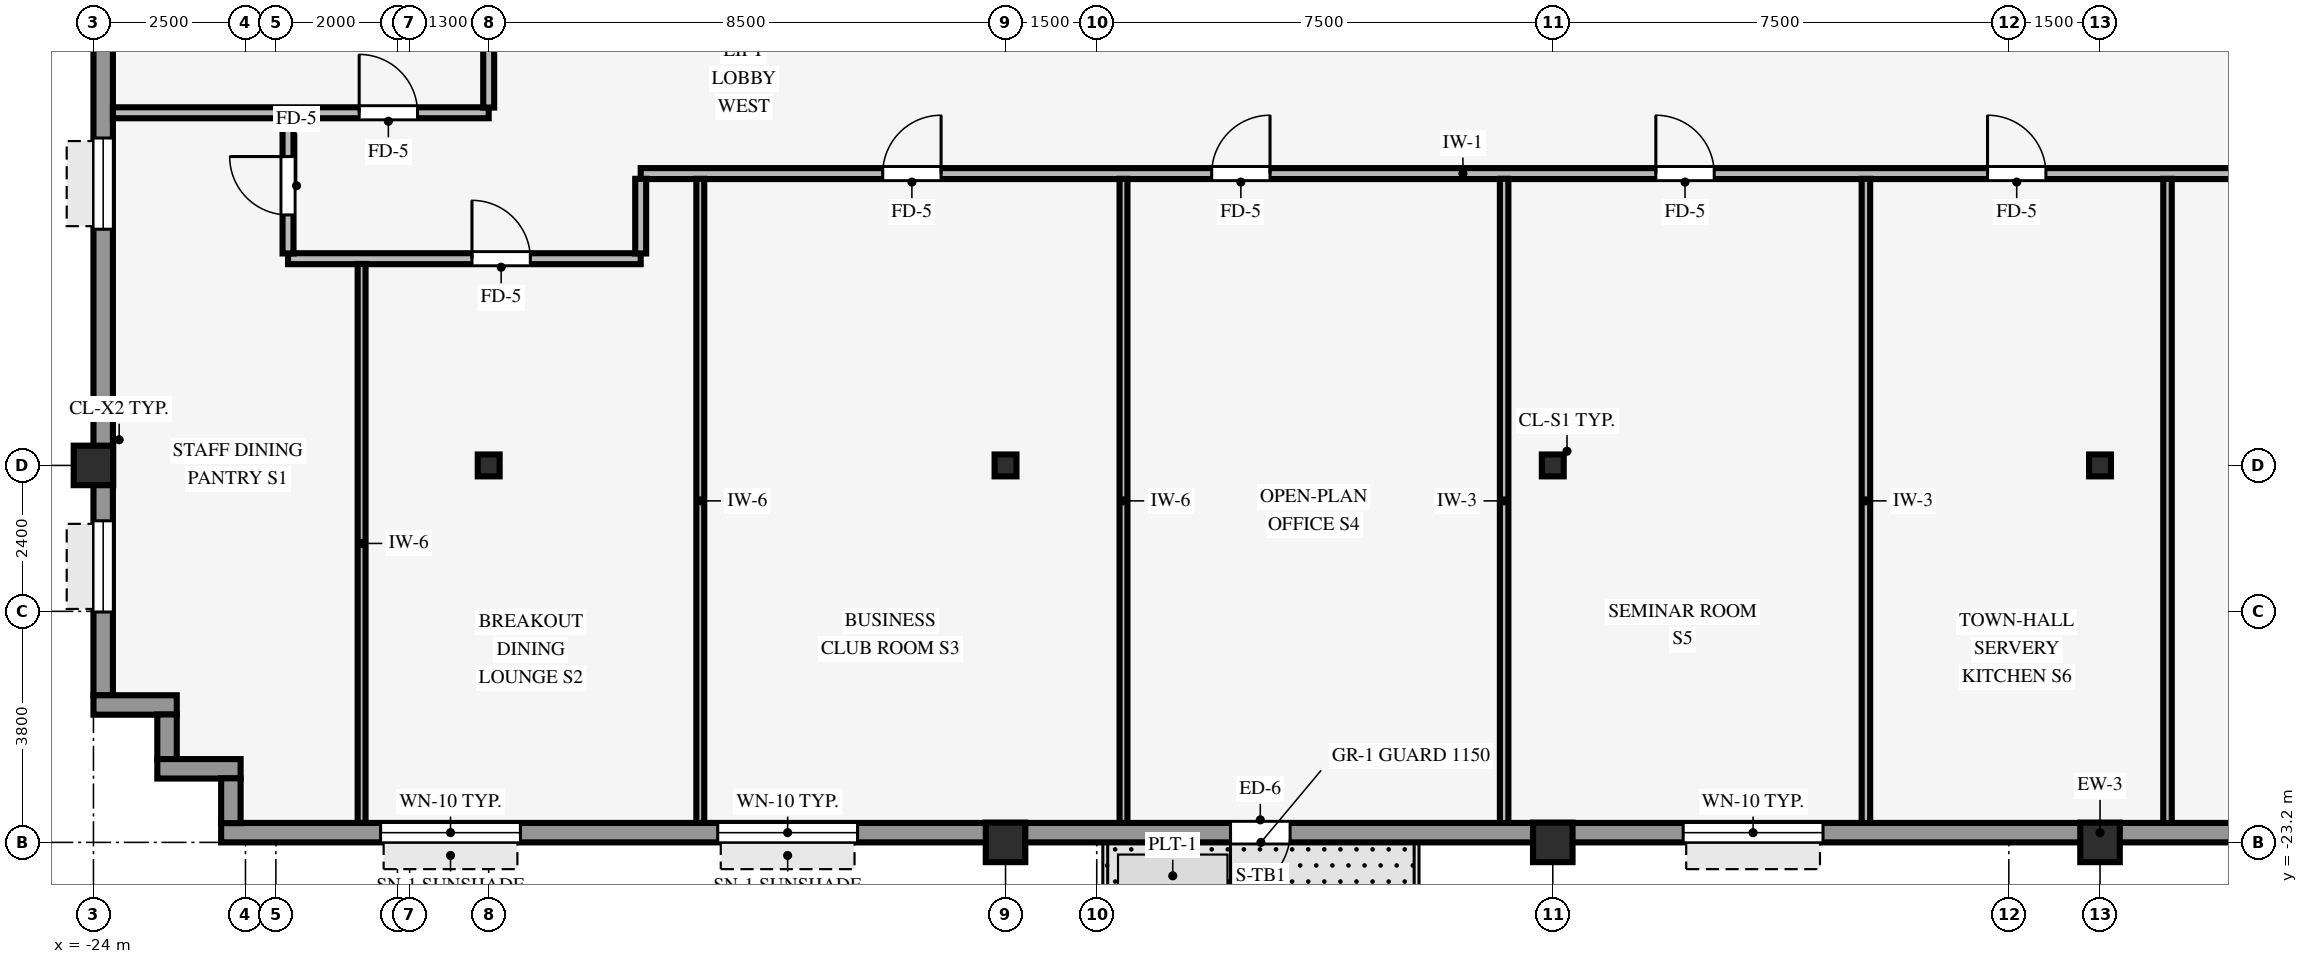
"""IFC4 building model, lengths in metres.
Left out: names, types, materials, properties, quantities, classifications, styles, units other than length and angle.
Written with IfcOpenShell. Run it as: python <this file> out.ifc"""

import sys

from ifc_helpers import new_model, si_unit, direction, frame, frame_2d, origin, origin_2d, place, context, subcontext, project, spatial, rectangle, hollow_rectangle, i_section, extrude, source, transform, mapped, element, fill, save


model = new_model("IFC4")
c1 = context("Model", 3, precision=1e-05, world=origin(), true_north=direction((0.0, 1.0)))
c2 = subcontext(c1, "Body", "Model", "MODEL_VIEW")
j1 = project(units=[si_unit("LENGTHUNIT", "METRE"), si_unit("PLANEANGLEUNIT", "RADIAN")], contexts=[c1])
p1 = place(None, origin())
s1 = spatial("IfcSite", under=j1, at=p1, CompositionType="ELEMENT")
p2 = place(p1, origin())
s2 = spatial("IfcBuilding", under=s1, at=p2, CompositionType="ELEMENT")
p3 = place(p2, frame((0.0, 0.0, 98.3)))
s3 = spatial("IfcBuildingStorey", under=s2, at=p3, CompositionType="ELEMENT", Elevation=98.3)
for number, where, z_axis, x_axis in (
    (1, (-24.0, -17.0, 0.0), (0.0, 0.0, 1.0), (1.0, 0.0, 0.0)),
    (2, (-9.0, -23.2, 0.0), (0.0, 0.0, 1.0), (1.0, 0.0, 0.0)),
    (3, (0.0, -23.2, 0.0), (0.0, 0.0, 1.0), (1.0, 0.0, 0.0)),
    (4, (9.0, -23.2, 0.0), (0.0, 0.0, 1.0), (1.0, 0.0, 0.0)),
):
    element("IfcColumn", number, at=place(p3, frame(where, z_axis=z_axis, x_axis=x_axis)), inside=s3, PredefinedType="COLUMN", context=c2, shape_type="SweptSolid", body=[
        extrude(hollow_rectangle(XDim=0.65, YDim=0.65, WallThickness=0.04, InnerFilletRadius=0.04, OuterFilletRadius=0.08, at=origin_2d()), origin(), (0.0, 0.0, 1.0), 3.37),
    ])
for number, where, z_axis, x_axis in (
    (5, (0.0, -17.0, 0.0), (0.0, 0.0, 1.0), (1.0, 0.0, 0.0)),
    (6, (-17.5, -17.0, 0.0), (0.0, 0.0, 1.0), (1.0, 0.0, 0.0)),
    (7, (-9.0, -17.0, 0.0), (0.0, 0.0, 1.0), (1.0, 0.0, 0.0)),
    (8, (9.0, -17.0, 0.0), (0.0, 0.0, 1.0), (1.0, 0.0, 0.0)),
):
    element("IfcColumn", number, at=place(p3, frame(where, z_axis=z_axis, x_axis=x_axis)), inside=s3, PredefinedType="COLUMN", context=c2, shape_type="SweptSolid", body=[
        extrude(i_section(OverallWidth=0.36, OverallDepth=0.36, WebThickness=0.021, FlangeThickness=0.021, FilletRadius=0.018, at=origin_2d()), origin(), (0.0, 0.0, 1.0), 3.37),
    ])
p4 = place(p3, frame((-21.9, -23.04, 0.0), z_axis=(0.0, 0.0, 1.0), x_axis=(1.0, 0.0, 0.0)))
e9 = element("IfcWall", 9, at=p4, inside=s3, PredefinedType="STANDARD", context=c2, shape_type="SweptSolid", body=[
    extrude(rectangle(XDim=43.8, YDim=0.32, at=frame_2d((21.9, 0.0))), origin(), (0.0, 0.0, 1.0), 2.705),
])
p5 = place(p4, frame((17.58, 0.0, 0.0), z_axis=(0.0, 0.0, 1.0), x_axis=(-1.0, 0.0, 0.0)))
e10 = element("IfcOpeningElement", 10, at=p5, cuts=e9, PredefinedType="OPENING", context=c2, shape_type="SweptSolid", body=[
    extrude(rectangle(XDim=0.98, YDim=2.15, at=frame_2d((0.49, 1.075))), frame((0.0, 0.17, 0.0), z_axis=(0.0, -1.0, 0.0), x_axis=(1.0, 0.0, 0.0)), (0.0, 0.0, 1.0), 0.34),
])
p6 = place(p4, frame((2.622, 0.0, 0.8)))
e11 = element("IfcOpeningElement", 11, at=p6, cuts=e9, PredefinedType="OPENING", context=c2, shape_type="SweptSolid", body=[
    extrude(rectangle(XDim=2.3, YDim=1.62, at=frame_2d((1.15, 0.81))), frame((0.0, 0.17, 0.0), z_axis=(0.0, -1.0, 0.0), x_axis=(1.0, 0.0, 0.0)), (0.0, 0.0, 1.0), 0.34),
])
p7 = place(p4, frame((8.167, 0.0, 0.8)))
e12 = element("IfcOpeningElement", 12, at=p7, cuts=e9, PredefinedType="OPENING", context=c2, shape_type="SweptSolid", body=[
    extrude(rectangle(XDim=2.3, YDim=1.62, at=frame_2d((1.15, 0.81))), frame((0.0, 0.17, 0.0), z_axis=(0.0, -1.0, 0.0), x_axis=(1.0, 0.0, 0.0)), (0.0, 0.0, 1.0), 0.34),
])
p8 = place(p4, frame((24.044, 0.0, 0.8)))
e13 = element("IfcOpeningElement", 13, at=p8, cuts=e9, PredefinedType="OPENING", context=c2, shape_type="SweptSolid", body=[
    extrude(rectangle(XDim=2.3, YDim=1.62, at=frame_2d((1.15, 0.81))), frame((0.0, 0.17, 0.0), z_axis=(0.0, -1.0, 0.0), x_axis=(1.0, 0.0, 0.0)), (0.0, 0.0, 1.0), 0.34),
])
p9 = place(p4, frame((34.233, 0.0, 0.8)))
e14 = element("IfcOpeningElement", 14, at=p9, cuts=e9, PredefinedType="OPENING", context=c2, shape_type="SweptSolid", body=[
    extrude(rectangle(XDim=2.3, YDim=1.62, at=frame_2d((1.15, 0.81))), frame((0.0, 0.17, 0.0), z_axis=(0.0, -1.0, 0.0), x_axis=(1.0, 0.0, 0.0)), (0.0, 0.0, 1.0), 0.34),
])
p10 = place(p4, frame((38.878, 0.0, 0.8)))
e15 = element("IfcOpeningElement", 15, at=p10, cuts=e9, PredefinedType="OPENING", context=c2, shape_type="SweptSolid", body=[
    extrude(rectangle(XDim=2.3, YDim=1.62, at=frame_2d((1.15, 0.81))), frame((0.0, 0.17, 0.0), z_axis=(0.0, -1.0, 0.0), x_axis=(1.0, 0.0, 0.0)), (0.0, 0.0, 1.0), 0.34),
])
p11 = place(p3, frame((-23.84, -20.784, 0.0), z_axis=(0.0, 0.0, 1.0), x_axis=(0.0, 1.0, 0.0)))
e16 = element("IfcWall", 16, at=p11, inside=s3, PredefinedType="STANDARD", context=c2, shape_type="SweptSolid", body=[
    extrude(rectangle(XDim=41.568, YDim=0.32, at=frame_2d((20.784, 0.0))), origin(), (0.0, 0.0, 1.0), 2.705),
])
p12 = place(p11, frame((1.373, 0.0, 0.8)))
e17 = element("IfcOpeningElement", 17, at=p12, cuts=e16, PredefinedType="OPENING", context=c2, shape_type="SweptSolid", body=[
    extrude(rectangle(XDim=1.5, YDim=1.6, at=frame_2d((0.75, 0.8))), frame((0.0, 0.17, 0.0), z_axis=(0.0, -1.0, 0.0), x_axis=(1.0, 0.0, 0.0)), (0.0, 0.0, 1.0), 0.34),
])
p13 = place(p11, frame((7.669, 0.0, 0.8)))
e18 = element("IfcOpeningElement", 18, at=p13, cuts=e16, PredefinedType="OPENING", context=c2, shape_type="SweptSolid", body=[
    extrude(rectangle(XDim=1.5, YDim=1.6, at=frame_2d((0.75, 0.8))), frame((0.0, 0.17, 0.0), z_axis=(0.0, -1.0, 0.0), x_axis=(1.0, 0.0, 0.0)), (0.0, 0.0, 1.0), 0.34),
])
p14 = place(p11, frame((12.615, 0.0, 0.8)))
e19 = element("IfcOpeningElement", 19, at=p14, cuts=e16, PredefinedType="OPENING", context=c2, shape_type="SweptSolid", body=[
    extrude(rectangle(XDim=1.5, YDim=1.6, at=frame_2d((0.75, 0.8))), frame((0.0, 0.17, 0.0), z_axis=(0.0, -1.0, 0.0), x_axis=(1.0, 0.0, 0.0)), (0.0, 0.0, 1.0), 0.34),
])
p15 = place(p11, frame((17.561, 0.0, 0.8)))
e20 = element("IfcOpeningElement", 20, at=p15, cuts=e16, PredefinedType="OPENING", context=c2, shape_type="SweptSolid", body=[
    extrude(rectangle(XDim=1.5, YDim=1.6, at=frame_2d((0.75, 0.8))), frame((0.0, 0.17, 0.0), z_axis=(0.0, -1.0, 0.0), x_axis=(1.0, 0.0, 0.0)), (0.0, 0.0, 1.0), 0.34),
])
p16 = place(p11, frame((22.507, 0.0, 0.8)))
e21 = element("IfcOpeningElement", 21, at=p16, cuts=e16, PredefinedType="OPENING", context=c2, shape_type="SweptSolid", body=[
    extrude(rectangle(XDim=1.5, YDim=1.6, at=frame_2d((0.75, 0.8))), frame((0.0, 0.17, 0.0), z_axis=(0.0, -1.0, 0.0), x_axis=(1.0, 0.0, 0.0)), (0.0, 0.0, 1.0), 0.34),
])
p17 = place(p11, frame((27.453, 0.0, 0.8)))
e22 = element("IfcOpeningElement", 22, at=p17, cuts=e16, PredefinedType="OPENING", context=c2, shape_type="SweptSolid", body=[
    extrude(rectangle(XDim=1.5, YDim=1.6, at=frame_2d((0.75, 0.8))), frame((0.0, 0.17, 0.0), z_axis=(0.0, -1.0, 0.0), x_axis=(1.0, 0.0, 0.0)), (0.0, 0.0, 1.0), 0.34),
])
p18 = place(p11, frame((32.399, 0.0, 0.8)))
e23 = element("IfcOpeningElement", 23, at=p18, cuts=e16, PredefinedType="OPENING", context=c2, shape_type="SweptSolid", body=[
    extrude(rectangle(XDim=1.5, YDim=1.6, at=frame_2d((0.75, 0.8))), frame((0.0, 0.17, 0.0), z_axis=(0.0, -1.0, 0.0), x_axis=(1.0, 0.0, 0.0)), (0.0, 0.0, 1.0), 0.34),
])
p19 = place(p11, frame((38.695, 0.0, 0.8)))
e24 = element("IfcOpeningElement", 24, at=p19, cuts=e16, PredefinedType="OPENING", context=c2, shape_type="SweptSolid", body=[
    extrude(rectangle(XDim=1.5, YDim=1.6, at=frame_2d((0.75, 0.8))), frame((0.0, 0.17, 0.0), z_axis=(0.0, -1.0, 0.0), x_axis=(1.0, 0.0, 0.0)), (0.0, 0.0, 1.0), 0.34),
])
p20 = place(p3, frame((-24.0, -20.94, 0.0), z_axis=(0.0, 0.0, 1.0), x_axis=(1.0, 0.0, 0.0)))
e25 = element("IfcWall", 25, at=p20, inside=s3, PredefinedType="STANDARD", context=c2, shape_type="SweptSolid", body=[
    extrude(rectangle(XDim=1.37, YDim=0.32, at=frame_2d((0.685, 0.0))), origin(), (0.0, 0.0, 1.0), 3.36),
])
p21 = place(p3, frame((-22.79, -21.834, 0.0), z_axis=(0.0, 0.0, 1.0), x_axis=(0.0, 1.0, 0.0)))
e26 = element("IfcWall", 26, at=p21, inside=s3, PredefinedType="STANDARD", context=c2, shape_type="SweptSolid", body=[
    extrude(rectangle(XDim=0.738, YDim=0.32, at=frame_2d((0.369, 0.0))), origin(), (0.0, 0.0, 1.0), 3.36),
])
p22 = place(p3, frame((-22.95, -21.99, 0.0), z_axis=(0.0, 0.0, 1.0), x_axis=(1.0, 0.0, 0.0)))
e27 = element("IfcWall", 27, at=p22, inside=s3, PredefinedType="STANDARD", context=c2, shape_type="SweptSolid", body=[
    extrude(rectangle(XDim=1.37, YDim=0.32, at=frame_2d((0.685, 0.0))), origin(), (0.0, 0.0, 1.0), 3.36),
])
p23 = place(p3, frame((-21.74, -22.884, 0.0), z_axis=(0.0, 0.0, 1.0), x_axis=(0.0, 1.0, 0.0)))
e28 = element("IfcWall", 28, at=p23, inside=s3, PredefinedType="STANDARD", context=c2, shape_type="SweptSolid", body=[
    extrude(rectangle(XDim=0.738, YDim=0.32, at=frame_2d((0.369, 0.0))), origin(), (0.0, 0.0, 1.0), 3.36),
])
p24 = place(p3, frame((-20.8, -13.6, 0.0), z_axis=(0.0, 0.0, 1.0), x_axis=(1.0, 0.0, 0.0)))
e29 = element("IfcWall", 29, at=p24, inside=s3, PredefinedType="PARTITIONING", context=c2, shape_type="SweptSolid", body=[
    extrude(rectangle(XDim=5.8, YDim=0.18, at=frame_2d((2.9, 0.0))), origin(), (0.0, 0.0, 1.0), 2.998),
])
p25 = place(p24, frame((3.025, 0.0, 0.0)))
e30 = element("IfcOpeningElement", 30, at=p25, cuts=e29, PredefinedType="OPENING", context=c2, shape_type="SweptSolid", body=[
    extrude(rectangle(XDim=0.96, YDim=2.1, at=frame_2d((0.48, 1.05))), frame((0.0, 0.1, 0.0), z_axis=(0.0, -1.0, 0.0), x_axis=(1.0, 0.0, 0.0)), (0.0, 0.0, 1.0), 0.2),
])
p26 = place(p3, frame((-15.0, -12.2, 0.0), z_axis=(0.0, 0.0, 1.0), x_axis=(1.0, 0.0, 0.0)))
e31 = element("IfcWall", 31, at=p26, inside=s3, PredefinedType="PARTITIONING", context=c2, shape_type="SweptSolid", body=[
    extrude(rectangle(XDim=30.0, YDim=0.18, at=frame_2d((15.0, 0.0))), origin(), (0.0, 0.0, 1.0), 3.36),
])
p27 = place(p26, frame((3.98, 0.0, 0.0)))
e32 = element("IfcOpeningElement", 32, at=p27, cuts=e31, PredefinedType="OPENING", context=c2, shape_type="SweptSolid", body=[
    extrude(rectangle(XDim=0.96, YDim=2.1, at=frame_2d((0.48, 1.05))), frame((0.0, 0.1, 0.0), z_axis=(0.0, -1.0, 0.0), x_axis=(1.0, 0.0, 0.0)), (0.0, 0.0, 1.0), 0.2),
])
p28 = place(p26, frame((16.695, 0.0, 0.0)))
e33 = element("IfcOpeningElement", 33, at=p28, cuts=e31, PredefinedType="OPENING", context=c2, shape_type="SweptSolid", body=[
    extrude(rectangle(XDim=0.96, YDim=2.1, at=frame_2d((0.48, 1.05))), frame((0.0, 0.1, 0.0), z_axis=(0.0, -1.0, 0.0), x_axis=(1.0, 0.0, 0.0)), (0.0, 0.0, 1.0), 0.2),
])
p29 = place(p26, frame((22.15, 0.0, 0.0)))
e34 = element("IfcOpeningElement", 34, at=p29, cuts=e31, PredefinedType="OPENING", context=c2, shape_type="SweptSolid", body=[
    extrude(rectangle(XDim=0.96, YDim=2.1, at=frame_2d((0.48, 1.05))), frame((0.0, 0.1, 0.0), z_axis=(0.0, -1.0, 0.0), x_axis=(1.0, 0.0, 0.0)), (0.0, 0.0, 1.0), 0.2),
])
p30 = place(p26, frame((27.075, 0.0, 0.0)))
e35 = element("IfcOpeningElement", 35, at=p30, cuts=e31, PredefinedType="OPENING", context=c2, shape_type="SweptSolid", body=[
    extrude(rectangle(XDim=0.96, YDim=2.1, at=frame_2d((0.48, 1.05))), frame((0.0, 0.1, 0.0), z_axis=(0.0, -1.0, 0.0), x_axis=(1.0, 0.0, 0.0)), (0.0, 0.0, 1.0), 0.2),
])
p31 = place(p26, frame((9.39, 0.0, 0.0)))
e36 = element("IfcOpeningElement", 36, at=p31, cuts=e31, PredefinedType="OPENING", context=c2, shape_type="SweptSolid", body=[
    extrude(rectangle(XDim=0.96, YDim=2.1, at=frame_2d((0.48, 1.05))), frame((0.0, 0.1, 0.0), z_axis=(0.0, -1.0, 0.0), x_axis=(1.0, 0.0, 0.0)), (0.0, 0.0, 1.0), 0.2),
])
p32 = place(p3, frame((-23.68, -11.2, 0.0), z_axis=(0.0, 0.0, 1.0), x_axis=(1.0, 0.0, 0.0)))
e37 = element("IfcWall", 37, at=p32, inside=s3, PredefinedType="PARTITIONING", context=c2, shape_type="SweptSolid", body=[
    extrude(rectangle(XDim=6.18, YDim=0.18, at=frame_2d((3.09, 0.0))), origin(), (0.0, 0.0, 1.0), 3.36),
])
p33 = place(p32, frame((4.05, 0.0, 0.0)))
e38 = element("IfcOpeningElement", 38, at=p33, cuts=e37, PredefinedType="OPENING", context=c2, shape_type="SweptSolid", body=[
    extrude(rectangle(XDim=0.96, YDim=2.1, at=frame_2d((0.48, 1.05))), frame((0.0, 0.1, 0.0), z_axis=(0.0, -1.0, 0.0), x_axis=(1.0, 0.0, 0.0)), (0.0, 0.0, 1.0), 0.2),
])
p34 = place(p3, frame((-20.8, -13.514, 0.0), z_axis=(0.0, 0.0, 1.0), x_axis=(0.0, 1.0, 0.0)))
e39 = element("IfcWall", 39, at=p34, inside=s3, PredefinedType="PARTITIONING", context=c2, shape_type="SweptSolid", body=[
    extrude(rectangle(XDim=2.228, YDim=0.18, at=frame_2d((1.114, 0.0))), origin(), (0.0, 0.0, 1.0), 3.36),
])
p35 = place(p34, frame((0.634, 0.0, 0.0)))
e40 = element("IfcOpeningElement", 40, at=p35, cuts=e39, PredefinedType="OPENING", context=c2, shape_type="SweptSolid", body=[
    extrude(rectangle(XDim=0.96, YDim=2.1, at=frame_2d((0.48, 1.05))), frame((0.0, 0.1, 0.0), z_axis=(0.0, -1.0, 0.0), x_axis=(1.0, 0.0, 0.0)), (0.0, 0.0, 1.0), 0.2),
])
p36 = place(p3, frame((-19.59, -22.88, 0.0), z_axis=(0.0, 0.0, 1.0), x_axis=(0.0, 1.0, 0.0)))
e41 = element("IfcWall", 41, at=p36, inside=s3, PredefinedType="PARTITIONING", context=c2, shape_type="SweptSolid", body=[
    extrude(rectangle(XDim=9.194, YDim=0.13, at=frame_2d((4.597, 0.0))), origin(), (0.0, 0.0, 1.0), 3.36),
])
p37 = place(p3, frame((-17.5, -11.114, 0.0), z_axis=(0.0, 0.0, 1.0), x_axis=(0.0, 1.0, 0.0)))
e42 = element("IfcWall", 42, at=p37, inside=s3, PredefinedType="PARTITIONING", context=c2, shape_type="SweptSolid", body=[
    extrude(rectangle(XDim=0.968, YDim=0.18, at=frame_2d((0.484, 0.0))), origin(), (0.0, 0.0, 1.0), 2.738),
])
p38 = place(p3, frame((-15.0, -13.514, 0.0), z_axis=(0.0, 0.0, 1.0), x_axis=(0.0, 1.0, 0.0)))
e43 = element("IfcWall", 43, at=p38, inside=s3, PredefinedType="PARTITIONING", context=c2, shape_type="SweptSolid", body=[
    extrude(rectangle(XDim=1.228, YDim=0.18, at=frame_2d((0.614, 0.0))), origin(), (0.0, 0.0, 1.0), 3.36),
])
for number, where, z_axis, x_axis in (
    (44, (-14.02, -22.88, 0.0), (0.0, 0.0, 1.0), (0.0, 1.0, 0.0)),
    (45, (-7.06, -22.88, 0.0), (0.0, 0.0, 1.0), (0.0, 1.0, 0.0)),
):
    element("IfcWall", number, at=place(p3, frame(where, z_axis=z_axis, x_axis=x_axis)), inside=s3, PredefinedType="PARTITIONING", context=c2, shape_type="SweptSolid", body=[
        extrude(rectangle(XDim=10.594, YDim=0.13, at=frame_2d((5.297, 0.0))), origin(), (0.0, 0.0, 1.0), 3.36),
    ])
for number, where, z_axis, x_axis in (
    (46, (-0.8, -22.88, 0.0), (0.0, 0.0, 1.0), (0.0, 1.0, 0.0)),
    (47, (5.15, -22.88, 0.0), (0.0, 0.0, 1.0), (0.0, 1.0, 0.0)),
    (48, (10.11, -22.88, 0.0), (0.0, 0.0, 1.0), (0.0, 1.0, 0.0)),
):
    element("IfcWall", number, at=place(p3, frame(where, z_axis=z_axis, x_axis=x_axis)), inside=s3, PredefinedType="PARTITIONING", context=c2, shape_type="SweptSolid", body=[
        extrude(rectangle(XDim=10.594, YDim=0.14, at=frame_2d((5.297, 0.0))), origin(), (0.0, 0.0, 1.0), 3.36),
    ])
m1 = source(origin(), c2, "Body", "SweptSolid", [
    extrude(rectangle(XDim=0.98, YDim=2.15, at=frame_2d((0.49, 1.075))), frame((0.0, 0.025, 0.0), z_axis=(0.0, -1.0, 0.0), x_axis=(1.0, 0.0, 0.0)), (0.0, 0.0, 1.0), 0.05),
])
p39 = place(p5, origin())
e49 = element("IfcDoor", 49, at=p39, inside=s3, OperationType="SINGLE_SWING_RIGHT", PredefinedType="DOOR", context=c2, shape_type="MappedRepresentation", body=[
    mapped(m1, transform((0.0, 0.0, 0.0), scale=1.0)),
])
fill(e10, e49)
m2 = source(origin(), c2, "Body", "SweptSolid", [
    extrude(rectangle(XDim=2.3, YDim=1.62, at=frame_2d((1.15, 0.81))), frame((0.0, 0.03, 0.0), z_axis=(0.0, -1.0, 0.0), x_axis=(1.0, 0.0, 0.0)), (0.0, 0.0, 1.0), 0.06),
])
p40 = place(p6, origin())
e50 = element("IfcWindow", 50, at=p40, inside=s3, PartitioningType="SINGLE_PANEL", PredefinedType="WINDOW", context=c2, shape_type="MappedRepresentation", body=[
    mapped(m2, transform((0.0, 0.0, 0.0), scale=1.0)),
])
fill(e11, e50)
p41 = place(p7, origin())
e51 = element("IfcWindow", 51, at=p41, inside=s3, PartitioningType="SINGLE_PANEL", PredefinedType="WINDOW", context=c2, shape_type="MappedRepresentation", body=[
    mapped(m2, transform((0.0, 0.0, 0.0), scale=1.0)),
])
fill(e12, e51)
p42 = place(p8, origin())
e52 = element("IfcWindow", 52, at=p42, inside=s3, PartitioningType="SINGLE_PANEL", PredefinedType="WINDOW", context=c2, shape_type="MappedRepresentation", body=[
    mapped(m2, transform((0.0, 0.0, 0.0), scale=1.0)),
])
fill(e13, e52)
m3 = source(origin(), c2, "Body", "SweptSolid", [
    extrude(rectangle(XDim=1.5, YDim=1.6, at=frame_2d((0.75, 0.8))), frame((0.0, 0.03, 0.0), z_axis=(0.0, -1.0, 0.0), x_axis=(1.0, 0.0, 0.0)), (0.0, 0.0, 1.0), 0.06),
])
p43 = place(p12, origin())
e53 = element("IfcWindow", 53, at=p43, inside=s3, PartitioningType="SINGLE_PANEL", PredefinedType="WINDOW", context=c2, shape_type="MappedRepresentation", body=[
    mapped(m3, transform((0.0, 0.0, 0.0), scale=1.0)),
])
fill(e17, e53)
p44 = place(p13, origin())
e54 = element("IfcWindow", 54, at=p44, inside=s3, PartitioningType="SINGLE_PANEL", PredefinedType="WINDOW", context=c2, shape_type="MappedRepresentation", body=[
    mapped(m3, transform((0.0, 0.0, 0.0), scale=1.0)),
])
fill(e18, e54)
m4 = source(origin(), c2, "Body", "SweptSolid", [
    extrude(rectangle(XDim=0.96, YDim=2.1, at=frame_2d((0.48, 1.05))), frame((0.0, 0.025, 0.0), z_axis=(0.0, -1.0, 0.0), x_axis=(1.0, 0.0, 0.0)), (0.0, 0.0, 1.0), 0.05),
])
p45 = place(p27, origin())
e55 = element("IfcDoor", 55, at=p45, inside=s3, OperationType="SINGLE_SWING_RIGHT", PredefinedType="DOOR", context=c2, shape_type="MappedRepresentation", body=[
    mapped(m4, transform((0.0, 0.0, 0.0), scale=1.0)),
])
fill(e32, e55)
p46 = place(p28, origin())
e56 = element("IfcDoor", 56, at=p46, inside=s3, OperationType="SINGLE_SWING_LEFT", PredefinedType="DOOR", context=c2, shape_type="MappedRepresentation", body=[
    mapped(m4, transform((0.0, 0.0, 0.0), scale=1.0)),
])
fill(e33, e56)
p47 = place(p29, origin())
e57 = element("IfcDoor", 57, at=p47, inside=s3, OperationType="SINGLE_SWING_LEFT", PredefinedType="DOOR", context=c2, shape_type="MappedRepresentation", body=[
    mapped(m4, transform((0.0, 0.0, 0.0), scale=1.0)),
])
fill(e34, e57)
p48 = place(p25, origin())
e58 = element("IfcDoor", 58, at=p48, inside=s3, OperationType="SINGLE_SWING_LEFT", PredefinedType="DOOR", context=c2, shape_type="MappedRepresentation", body=[
    mapped(m4, transform((0.0, 0.0, 0.0), scale=1.0)),
])
fill(e30, e58)
p49 = place(p31, origin())
e59 = element("IfcDoor", 59, at=p49, inside=s3, OperationType="SINGLE_SWING_RIGHT", PredefinedType="DOOR", context=c2, shape_type="MappedRepresentation", body=[
    mapped(m4, transform((0.0, 0.0, 0.0), scale=1.0)),
])
fill(e36, e59)
p50 = place(p33, origin())
e60 = element("IfcDoor", 60, at=p50, inside=s3, OperationType="SINGLE_SWING_LEFT", PredefinedType="DOOR", context=c2, shape_type="MappedRepresentation", body=[
    mapped(m4, transform((0.0, 0.0, 0.0), scale=1.0)),
])
fill(e38, e60)
p51 = place(p35, origin())
e61 = element("IfcDoor", 61, at=p51, inside=s3, OperationType="SINGLE_SWING_RIGHT", PredefinedType="DOOR", context=c2, shape_type="MappedRepresentation", body=[
    mapped(m4, transform((0.0, 0.0, 0.0), scale=1.0)),
])
fill(e40, e61)
save(model, sys.argv[1])
